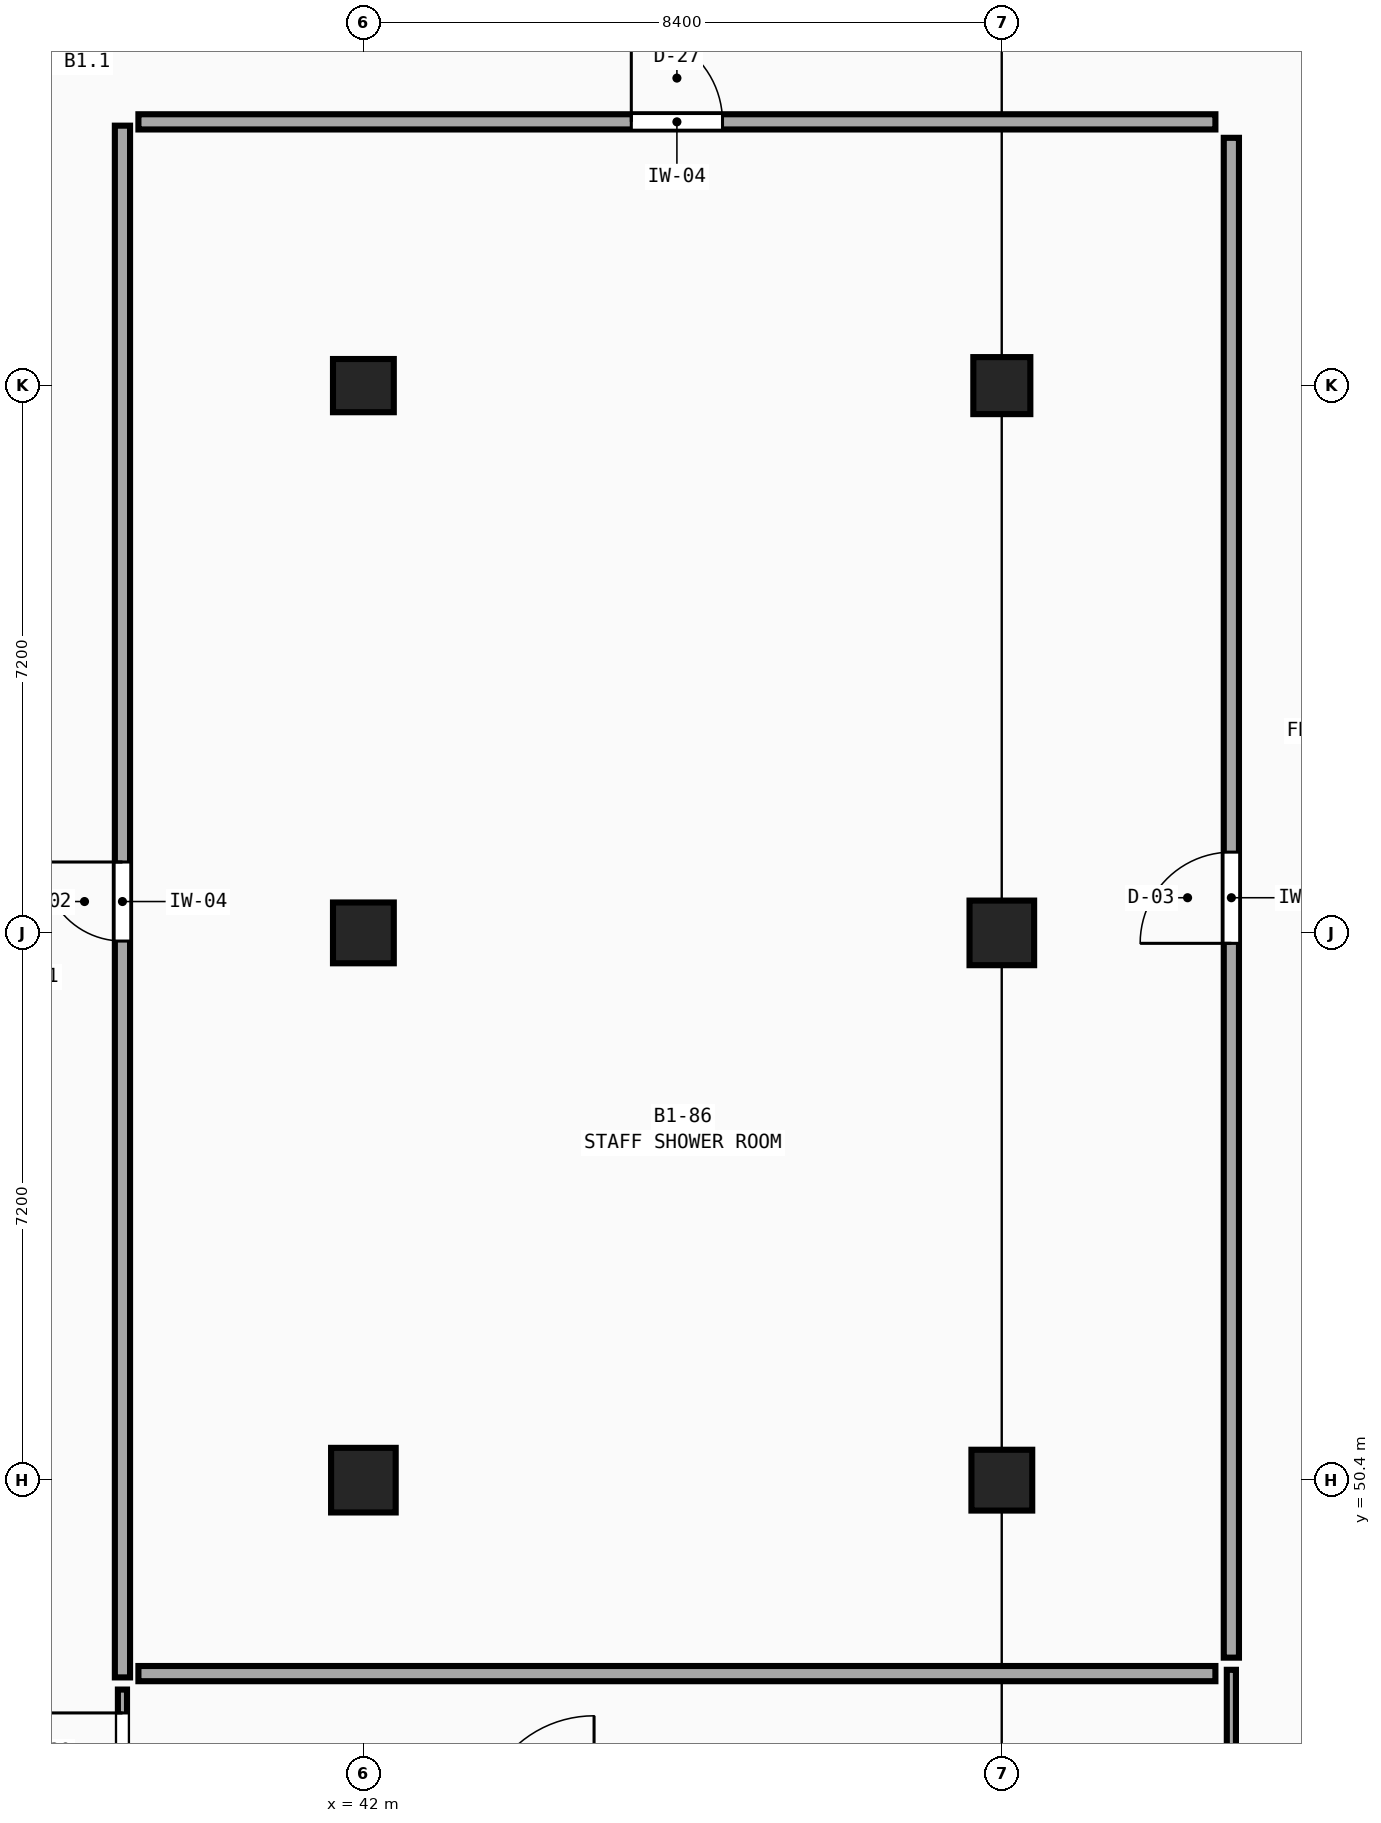
"""IFC4 building model, lengths in metres.
Left out: names, types, materials, properties, quantities, classifications, styles, units other than length and angle.
Written with IfcOpenShell. Run it as: python <this file> out.ifc"""

import sys

from ifc_helpers import new_model, si_unit, direction, frame, frame_2d, origin, origin_2d, place, context, subcontext, project, spatial, rectangle, extrude, element, fill, save


model = new_model("IFC4")
c1 = context("Model", 3, precision=1e-05, world=origin(), true_north=direction((0.0, 1.0)))
c2 = subcontext(c1, "Body", "Model", "MODEL_VIEW")
j1 = project(units=[si_unit("LENGTHUNIT", "METRE"), si_unit("PLANEANGLEUNIT", "RADIAN")], contexts=[c1])
p1 = place(None, origin())
s1 = spatial("IfcSite", under=j1, at=p1, CompositionType="ELEMENT")
p2 = place(p1, origin())
s2 = spatial("IfcBuilding", under=s1, at=p2, CompositionType="ELEMENT")
p3 = place(p2, frame((0.0, 0.0, -5.4)))
s3 = spatial("IfcBuildingStorey", under=s2, at=p3, CompositionType="ELEMENT", Elevation=-5.4)
p4 = place(p3, frame((42.0, 50.4, 0.0), z_axis=(0.0, 0.0, 1.0), x_axis=(1.0, 0.0, 0.0)))
e1 = element("IfcColumn", 1, at=p4, inside=s3, PredefinedType="COLUMN", context=c2, shape_type="SweptSolid", body=[
    extrude(rectangle(XDim=0.85, YDim=0.85, at=origin_2d()), origin(), (0.0, 0.0, 1.0), 5.4),
])
p5 = place(p3, frame((42.0, 57.6, 0.0), z_axis=(0.0, 0.0, 1.0), x_axis=(1.0, 0.0, 0.0)))
e2 = element("IfcColumn", 2, at=p5, inside=s3, PredefinedType="COLUMN", context=c2, shape_type="SweptSolid", body=[
    extrude(rectangle(XDim=0.8, YDim=0.8, at=origin_2d()), origin(), (0.0, 0.0, 1.0), 5.4),
])
p6 = place(p3, frame((42.0, 64.8, 0.0), z_axis=(0.0, 0.0, 1.0), x_axis=(1.0, 0.0, 0.0)))
e3 = element("IfcColumn", 3, at=p6, inside=s3, PredefinedType="COLUMN", context=c2, shape_type="SweptSolid", body=[
    extrude(rectangle(XDim=0.8, YDim=0.7, at=origin_2d()), origin(), (0.0, 0.0, 1.0), 5.4),
])
p7 = place(p3, frame((50.4, 50.4, 0.0), z_axis=(0.0, 0.0, 1.0), x_axis=(1.0, 0.0, 0.0)))
e4 = element("IfcColumn", 4, at=p7, inside=s3, PredefinedType="COLUMN", context=c2, shape_type="SweptSolid", body=[
    extrude(rectangle(XDim=0.8, YDim=0.8, at=origin_2d()), origin(), (0.0, 0.0, 1.0), 5.4),
])
p8 = place(p3, frame((50.4, 57.6, 0.0), z_axis=(0.0, 0.0, 1.0), x_axis=(1.0, 0.0, 0.0)))
e5 = element("IfcColumn", 5, at=p8, inside=s3, PredefinedType="COLUMN", context=c2, shape_type="SweptSolid", body=[
    extrude(rectangle(XDim=0.85, YDim=0.85, at=origin_2d()), origin(), (0.0, 0.0, 1.0), 5.4),
])
p9 = place(p3, frame((50.4, 64.8, 0.0), z_axis=(0.0, 0.0, 1.0), x_axis=(1.0, 0.0, 0.0)))
e6 = element("IfcColumn", 6, at=p9, inside=s3, PredefinedType="COLUMN", context=c2, shape_type="SweptSolid", body=[
    extrude(rectangle(XDim=0.75, YDim=0.75, at=origin_2d()), origin(), (0.0, 0.0, 1.0), 5.4),
])
p10 = place(p3, frame((38.83, 47.805, 0.0), z_axis=(0.0, 0.0, 1.0), x_axis=(0.0, 1.0, 0.0)))
e7 = element("IfcWall", 7, at=p10, inside=s3, PredefinedType="PLUMBINGWALL", context=c2, shape_type="SweptSolid", body=[
    extrude(rectangle(XDim=20.415, YDim=0.2, at=frame_2d((10.208, 0.0))), origin(), (0.0, 0.0, 1.0), 5.05),
])
p11 = place(p10, frame((9.688, 0.0, 0.0)))
e8 = element("IfcOpeningElement", 8, at=p11, cuts=e7, PredefinedType="OPENING", context=c2, shape_type="SweptSolid", body=[
    extrude(rectangle(XDim=1.04, YDim=2.05, at=frame_2d((0.52, 1.025))), frame((0.0, 0.12, 0.0), z_axis=(0.0, -1.0, 0.0), x_axis=(1.0, 0.0, 0.0)), (0.0, 0.0, 1.0), 0.24),
])
p12 = place(p3, frame((53.42, 48.065, 0.0), z_axis=(0.0, 0.0, 1.0), x_axis=(0.0, 1.0, 0.0)))
e9 = element("IfcWall", 9, at=p12, inside=s3, PredefinedType="PLUMBINGWALL", context=c2, shape_type="SweptSolid", body=[
    extrude(rectangle(XDim=19.995, YDim=0.2, at=frame_2d((9.998, 0.0))), origin(), (0.0, 0.0, 1.0), 5.05),
])
p13 = place(p12, frame((9.397, 0.0, 0.0)))
e10 = element("IfcOpeningElement", 10, at=p13, cuts=e9, PredefinedType="OPENING", context=c2, shape_type="SweptSolid", body=[
    extrude(rectangle(XDim=1.2, YDim=2.05, at=frame_2d((0.6, 1.025))), frame((0.0, 0.12, 0.0), z_axis=(0.0, -1.0, 0.0), x_axis=(1.0, 0.0, 0.0)), (0.0, 0.0, 1.0), 0.24),
])
p14 = place(p3, frame((39.04, 68.27, 0.0), z_axis=(0.0, 0.0, 1.0), x_axis=(1.0, 0.0, 0.0)))
e11 = element("IfcWall", 11, at=p14, inside=s3, PredefinedType="PLUMBINGWALL", context=c2, shape_type="SweptSolid", body=[
    extrude(rectangle(XDim=14.17, YDim=0.2, at=frame_2d((7.085, 0.0))), origin(), (0.0, 0.0, 1.0), 5.05),
])
p15 = place(p14, frame((6.485, 0.0, 0.0)))
e12 = element("IfcOpeningElement", 12, at=p15, cuts=e11, PredefinedType="OPENING", context=c2, shape_type="SweptSolid", body=[
    extrude(rectangle(XDim=1.2, YDim=2.37, at=frame_2d((0.6, 1.185))), frame((0.0, 0.12, 0.0), z_axis=(0.0, -1.0, 0.0), x_axis=(1.0, 0.0, 0.0)), (0.0, 0.0, 1.0), 0.24),
])
p16 = place(p3, frame((53.42, 36.37, 0.0), z_axis=(0.0, 0.0, 1.0), x_axis=(0.0, 1.0, 0.0)))
e13 = element("IfcWall", 13, at=p16, inside=s3, PredefinedType="PARTITIONING", context=c2, shape_type="SweptSolid", body=[
    extrude(rectangle(XDim=11.535, YDim=0.12, at=frame_2d((5.768, 0.0))), origin(), (0.0, 0.0, 1.0), 5.05),
])
p17 = place(p16, frame((5.248, 0.0, 0.0)))
e14 = element("IfcOpeningElement", 14, at=p17, cuts=e13, PredefinedType="OPENING", context=c2, shape_type="SweptSolid", body=[
    extrude(rectangle(XDim=1.04, YDim=2.05, at=frame_2d((0.52, 1.025))), frame((0.0, 0.08, 0.0), z_axis=(0.0, -1.0, 0.0), x_axis=(1.0, 0.0, 0.0)), (0.0, 0.0, 1.0), 0.16),
])
p18 = place(p3, frame((38.83, 45.99, 0.0), z_axis=(0.0, 0.0, 1.0), x_axis=(0.0, 1.0, 0.0)))
e15 = element("IfcWall", 15, at=p18, inside=s3, PredefinedType="PARTITIONING", context=c2, shape_type="SweptSolid", body=[
    extrude(rectangle(XDim=1.655, YDim=0.12, at=frame_2d((0.828, 0.0))), origin(), (0.0, 0.0, 1.0), 5.05),
])
p19 = place(p18, frame((0.308, 0.0, 0.0)))
e16 = element("IfcOpeningElement", 16, at=p19, cuts=e15, PredefinedType="OPENING", context=c2, shape_type="SweptSolid", body=[
    extrude(rectangle(XDim=1.04, YDim=2.29, at=frame_2d((0.52, 1.145))), frame((0.0, 0.08, 0.0), z_axis=(0.0, -1.0, 0.0), x_axis=(1.0, 0.0, 0.0)), (0.0, 0.0, 1.0), 0.16),
])
p20 = place(p3, frame((39.04, 47.855, 0.0), z_axis=(0.0, 0.0, 1.0), x_axis=(1.0, 0.0, 0.0)))
e17 = element("IfcWall", 17, at=p20, inside=s3, PredefinedType="PLUMBINGWALL", context=c2, shape_type="SweptSolid", body=[
    extrude(rectangle(XDim=14.17, YDim=0.2, at=frame_2d((7.085, 0.0))), origin(), (0.0, 0.0, 1.0), 5.05),
])
p21 = place(p11, origin())
e18 = element("IfcDoor", 18, at=p21, inside=s3, OperationType="SINGLE_SWING_RIGHT", PredefinedType="DOOR", context=c2, shape_type="SweptSolid", body=[
    extrude(rectangle(XDim=1.04, YDim=2.05, at=frame_2d((0.52, 1.025))), frame((0.0, 0.025, 0.0), z_axis=(0.0, -1.0, 0.0), x_axis=(1.0, 0.0, 0.0)), (0.0, 0.0, 1.0), 0.05),
])
fill(e8, e18)
p22 = place(p13, origin())
e19 = element("IfcDoor", 19, at=p22, inside=s3, OperationType="SINGLE_SWING_LEFT", PredefinedType="DOOR", context=c2, shape_type="SweptSolid", body=[
    extrude(rectangle(XDim=1.2, YDim=2.05, at=frame_2d((0.6, 1.025))), frame((0.0, 0.025, 0.0), z_axis=(0.0, -1.0, 0.0), x_axis=(1.0, 0.0, 0.0)), (0.0, 0.0, 1.0), 0.05),
])
fill(e10, e19)
p23 = place(p15, origin())
e20 = element("IfcDoor", 20, at=p23, inside=s3, OperationType="SINGLE_SWING_LEFT", PredefinedType="DOOR", context=c2, shape_type="SweptSolid", body=[
    extrude(rectangle(XDim=1.2, YDim=2.37, at=frame_2d((0.6, 1.185))), frame((0.0, 0.025, 0.0), z_axis=(0.0, -1.0, 0.0), x_axis=(1.0, 0.0, 0.0)), (0.0, 0.0, 1.0), 0.05),
])
fill(e12, e20)
p24 = place(p19, origin())
e21 = element("IfcDoor", 21, at=p24, inside=s3, OperationType="SINGLE_SWING_RIGHT", PredefinedType="DOOR", context=c2, shape_type="SweptSolid", body=[
    extrude(rectangle(XDim=1.04, YDim=2.29, at=frame_2d((0.52, 1.145))), frame((0.0, 0.025, 0.0), z_axis=(0.0, -1.0, 0.0), x_axis=(1.0, 0.0, 0.0)), (0.0, 0.0, 1.0), 0.05),
])
fill(e16, e21)
save(model, sys.argv[1])
